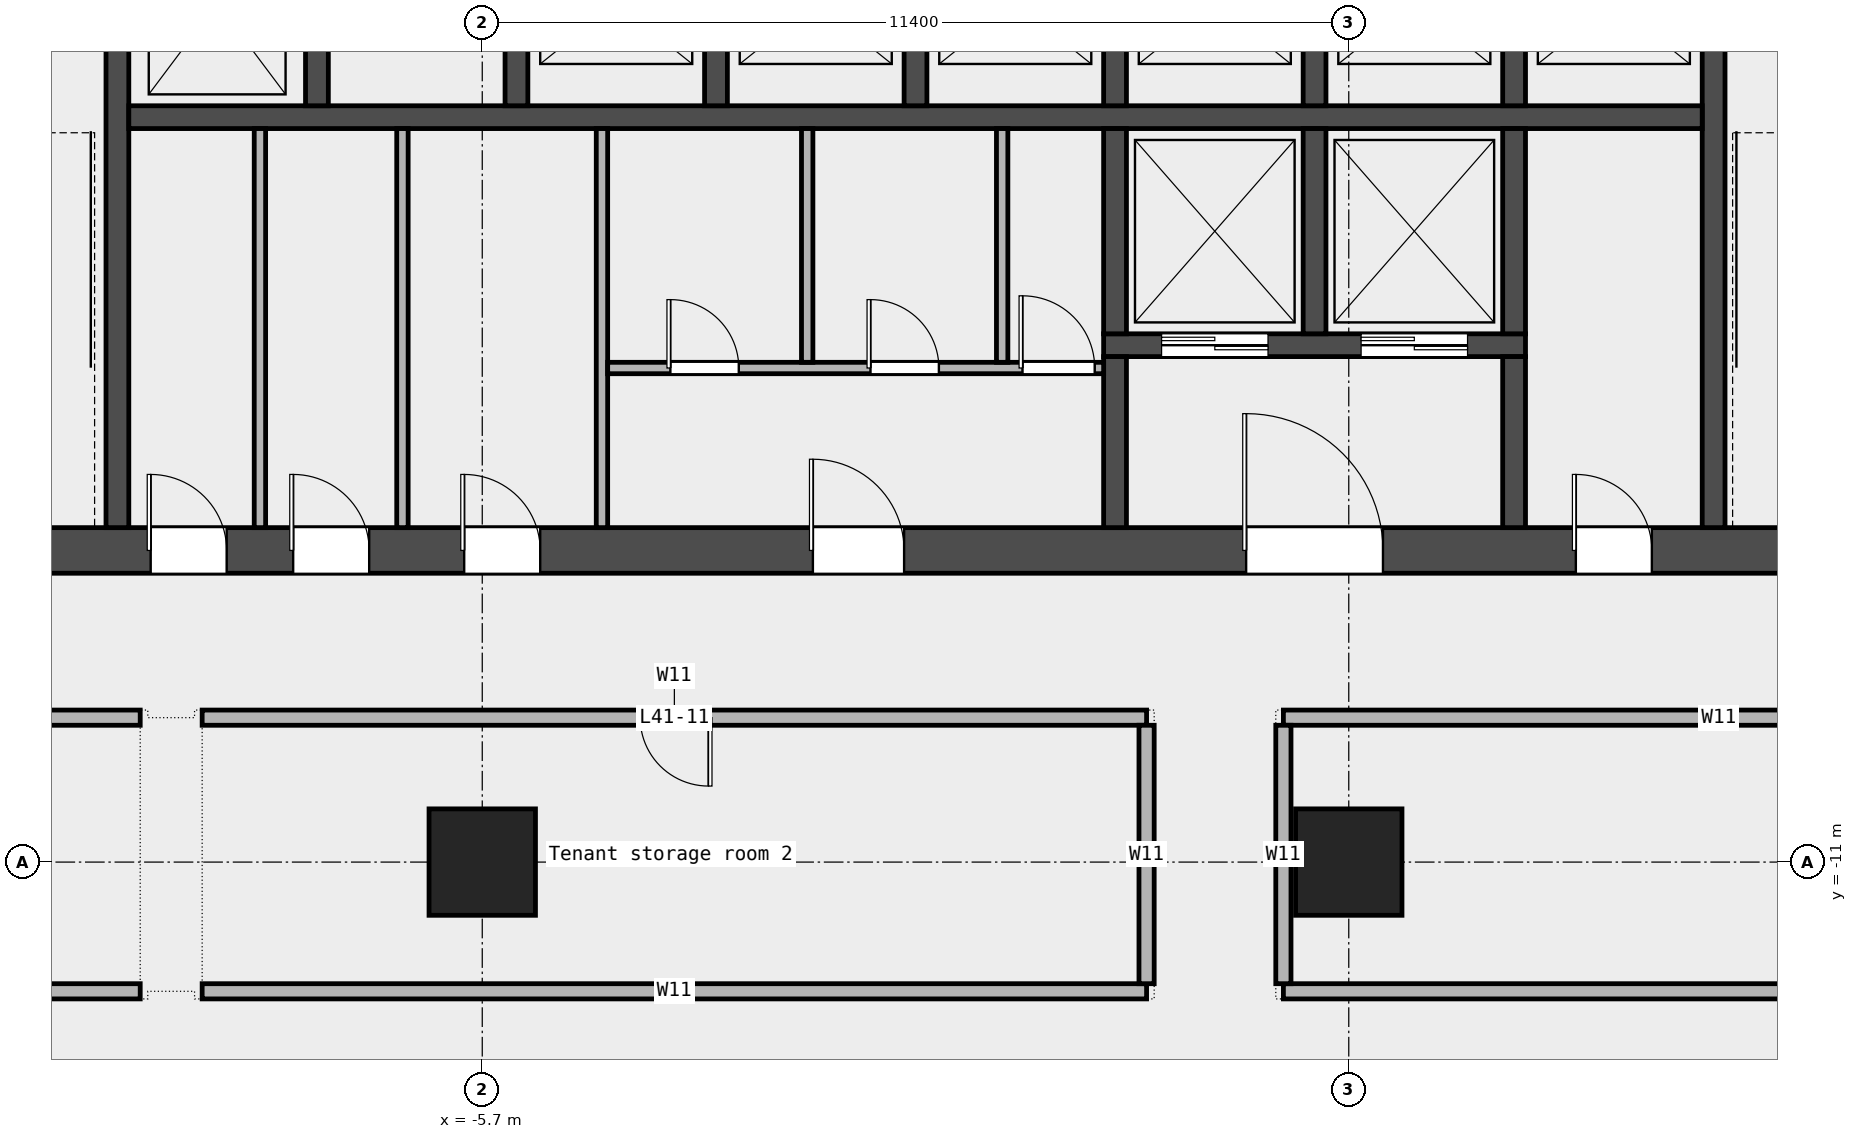
"""IFC4 building model, lengths in metres.
Left out: names, types, materials, properties, quantities, classifications, styles, units other than length and angle.
Written with IfcOpenShell. Run it as: python <this file> out.ifc"""

import sys

from ifc_helpers import new_model, si_unit, direction, frame, frame_2d, origin, origin_2d, place, context, subcontext, project, spatial, rectangle, extrude, element, fill, save


model = new_model("IFC4")
c1 = context("Model", 3, precision=1e-05, world=origin(), true_north=direction((0.0, 1.0)))
c2 = subcontext(c1, "Body", "Model", "MODEL_VIEW")
j1 = project(units=[si_unit("LENGTHUNIT", "METRE"), si_unit("PLANEANGLEUNIT", "RADIAN")], contexts=[c1])
p1 = place(None, origin())
s1 = spatial("IfcSite", under=j1, at=p1, CompositionType="ELEMENT")
p2 = place(p1, origin())
s2 = spatial("IfcBuilding", under=s1, at=p2, CompositionType="ELEMENT")
p3 = place(p2, frame((0.0, 0.0, 197.0)))
s3 = spatial("IfcBuildingStorey", under=s2, at=p3, CompositionType="ELEMENT", Elevation=197.0)
for number, where, z_axis, x_axis in (
    (1, (-5.7, -11.0, 0.0), (0.0, 0.0, 1.0), (1.0, 0.0, 0.0)),
    (2, (5.7, -11.0, 0.0), (0.0, 0.0, 1.0), (1.0, 0.0, 0.0)),
):
    element("IfcColumn", number, at=place(p3, frame(where, z_axis=z_axis, x_axis=x_axis)), inside=s3, PredefinedType="COLUMN", context=c2, shape_type="SweptSolid", body=[
        extrude(rectangle(XDim=1.4, YDim=1.4, at=origin_2d()), origin(), (0.0, 0.0, 1.0), 3.6),
    ])
p4 = place(p3, frame((-24.15, -12.7, 0.0), z_axis=(0.0, 0.0, 1.0), x_axis=(1.0, 0.0, 0.0)))
e3 = element("IfcWall", 3, at=p4, inside=s3, PredefinedType="PARTITIONING", context=c2, shape_type="SweptSolid", body=[
    extrude(rectangle(XDim=13.95, YDim=0.2, at=frame_2d((6.975, 0.0))), origin(), (0.0, 0.0, 1.0), 3.6),
])
p5 = place(p4, frame((7.825, 0.0, 0.0)))
e4 = element("IfcOpeningElement", 4, at=p5, cuts=e3, PredefinedType="OPENING", context=c2, shape_type="SweptSolid", body=[
    extrude(rectangle(XDim=1.5, YDim=2.1, at=frame_2d((0.75, 1.05))), frame((0.0, 0.112, 0.0), z_axis=(0.0, -1.0, 0.0), x_axis=(1.0, 0.0, 0.0)), (0.0, 0.0, 1.0), 0.224),
])
p6 = place(p3, frame((-9.385, -12.7, 0.0), z_axis=(0.0, 0.0, 1.0), x_axis=(1.0, 0.0, 0.0)))
e5 = element("IfcWall", 5, at=p6, inside=s3, PredefinedType="PARTITIONING", context=c2, shape_type="SweptSolid", body=[
    extrude(rectangle(XDim=12.425, YDim=0.2, at=frame_2d((6.212, 0.0))), origin(), (0.0, 0.0, 1.0), 3.6),
])
p7 = place(p3, frame((4.84, -12.7, 0.0), z_axis=(0.0, 0.0, 1.0), x_axis=(1.0, 0.0, 0.0)))
e6 = element("IfcWall", 6, at=p7, inside=s3, PredefinedType="PARTITIONING", context=c2, shape_type="SweptSolid", body=[
    extrude(rectangle(XDim=21.31, YDim=0.2, at=frame_2d((10.655, 0.0))), origin(), (0.0, 0.0, 1.0), 3.6),
])
p8 = place(p7, frame((9.955, 0.0, 0.0)))
e7 = element("IfcOpeningElement", 7, at=p8, cuts=e6, PredefinedType="OPENING", context=c2, shape_type="SweptSolid", body=[
    extrude(rectangle(XDim=1.2, YDim=2.1, at=frame_2d((0.6, 1.05))), frame((0.0, 0.112, 0.0), z_axis=(0.0, -1.0, 0.0), x_axis=(1.0, 0.0, 0.0)), (0.0, 0.0, 1.0), 0.224),
])
p9 = place(p3, frame((-16.3, -9.1, 0.0), z_axis=(0.0, 0.0, 1.0), x_axis=(1.0, 0.0, 0.0)))
e8 = element("IfcWall", 8, at=p9, inside=s3, PredefinedType="PARTITIONING", context=c2, shape_type="SweptSolid", body=[
    extrude(rectangle(XDim=6.1, YDim=0.2, at=frame_2d((3.05, 0.0))), origin(), (0.0, 0.0, 1.0), 3.6),
])
p10 = place(p3, frame((-9.385, -9.1, 0.0), z_axis=(0.0, 0.0, 1.0), x_axis=(1.0, 0.0, 0.0)))
e9 = element("IfcWall", 9, at=p10, inside=s3, PredefinedType="PARTITIONING", context=c2, shape_type="SweptSolid", body=[
    extrude(rectangle(XDim=12.425, YDim=0.2, at=frame_2d((6.212, 0.0))), origin(), (0.0, 0.0, 1.0), 3.6),
])
p11 = place(p10, frame((5.762, 0.0, 0.0)))
e10 = element("IfcOpeningElement", 10, at=p11, cuts=e9, PredefinedType="OPENING", context=c2, shape_type="SweptSolid", body=[
    extrude(rectangle(XDim=0.9, YDim=2.1, at=frame_2d((0.45, 1.05))), frame((0.0, 0.112, 0.0), z_axis=(0.0, -1.0, 0.0), x_axis=(1.0, 0.0, 0.0)), (0.0, 0.0, 1.0), 0.224),
])
p12 = place(p3, frame((4.84, -9.1, 0.0), z_axis=(0.0, 0.0, 1.0), x_axis=(1.0, 0.0, 0.0)))
e11 = element("IfcWall", 11, at=p12, inside=s3, PredefinedType="PARTITIONING", context=c2, shape_type="SweptSolid", body=[
    extrude(rectangle(XDim=11.46, YDim=0.2, at=frame_2d((5.73, 0.0))), origin(), (0.0, 0.0, 1.0), 3.6),
])
for number, where, z_axis, x_axis in (
    (12, (3.04, -12.6, 0.0), (0.0, 0.0, 1.0), (0.0, 1.0, 0.0)),
    (13, (4.84, -12.6, 0.0), (0.0, 0.0, 1.0), (0.0, 1.0, 0.0)),
):
    element("IfcWall", number, at=place(p3, frame(where, z_axis=z_axis, x_axis=x_axis)), inside=s3, PredefinedType="PARTITIONING", context=c2, shape_type="SweptSolid", body=[
        extrude(rectangle(XDim=3.4, YDim=0.2, at=frame_2d((1.7, 0.0))), origin(), (0.0, 0.0, 1.0), 3.6),
    ])
p13 = place(p3, frame((-14.4, -6.9, 0.0), z_axis=(0.0, 0.0, 1.0), x_axis=(1.0, 0.0, 0.0)))
e14 = element("IfcWall", 14, at=p13, inside=s3, PredefinedType="SHEAR", context=c2, shape_type="SweptSolid", body=[
    extrude(rectangle(XDim=28.8, YDim=0.6, at=frame_2d((14.4, 0.0))), origin(), (0.0, 0.0, 1.0), 3.7),
])
p14 = place(p13, frame((4.337, 0.0, 0.0)))
e15 = element("IfcOpeningElement", 15, at=p14, cuts=e14, PredefinedType="OPENING", context=c2, shape_type="SweptSolid", body=[
    extrude(rectangle(XDim=1.0, YDim=2.1, at=frame_2d((0.5, 1.05))), frame((0.0, 0.312, 0.0), z_axis=(0.0, -1.0, 0.0), x_axis=(1.0, 0.0, 0.0)), (0.0, 0.0, 1.0), 0.624),
])
p15 = place(p13, frame((6.212, 0.0, 0.0)))
e16 = element("IfcOpeningElement", 16, at=p15, cuts=e14, PredefinedType="OPENING", context=c2, shape_type="SweptSolid", body=[
    extrude(rectangle(XDim=1.0, YDim=2.1, at=frame_2d((0.5, 1.05))), frame((0.0, 0.312, 0.0), z_axis=(0.0, -1.0, 0.0), x_axis=(1.0, 0.0, 0.0)), (0.0, 0.0, 1.0), 0.624),
])
p16 = place(p13, frame((8.462, 0.0, 0.0)))
e17 = element("IfcOpeningElement", 17, at=p16, cuts=e14, PredefinedType="OPENING", context=c2, shape_type="SweptSolid", body=[
    extrude(rectangle(XDim=1.0, YDim=2.1, at=frame_2d((0.5, 1.05))), frame((0.0, 0.312, 0.0), z_axis=(0.0, -1.0, 0.0), x_axis=(1.0, 0.0, 0.0)), (0.0, 0.0, 1.0), 0.624),
])
p17 = place(p13, frame((13.05, 0.0, 0.0)))
e18 = element("IfcOpeningElement", 18, at=p17, cuts=e14, PredefinedType="OPENING", context=c2, shape_type="SweptSolid", body=[
    extrude(rectangle(XDim=1.2, YDim=2.1, at=frame_2d((0.6, 1.05))), frame((0.0, 0.312, 0.0), z_axis=(0.0, -1.0, 0.0), x_axis=(1.0, 0.0, 0.0)), (0.0, 0.0, 1.0), 0.624),
])
p18 = place(p13, frame((18.75, 0.0, 0.0)))
e19 = element("IfcOpeningElement", 19, at=p18, cuts=e14, PredefinedType="OPENING", context=c2, shape_type="SweptSolid", body=[
    extrude(rectangle(XDim=1.8, YDim=2.1, at=frame_2d((0.9, 1.05))), frame((0.0, 0.312, 0.0), z_axis=(0.0, -1.0, 0.0), x_axis=(1.0, 0.0, 0.0)), (0.0, 0.0, 1.0), 0.624),
])
p19 = place(p13, frame((23.087, 0.0, 0.0)))
e20 = element("IfcOpeningElement", 20, at=p19, cuts=e14, PredefinedType="OPENING", context=c2, shape_type="SweptSolid", body=[
    extrude(rectangle(XDim=1.0, YDim=2.1, at=frame_2d((0.5, 1.05))), frame((0.0, 0.312, 0.0), z_axis=(0.0, -1.0, 0.0), x_axis=(1.0, 0.0, 0.0)), (0.0, 0.0, 1.0), 0.624),
])
for number, where, z_axis, x_axis in (
    (21, (-10.5, -6.6, 0.0), (0.0, 0.0, 1.0), (0.0, 1.0, 0.0)),
    (22, (10.5, -6.6, 0.0), (0.0, 0.0, 1.0), (0.0, 1.0, 0.0)),
):
    element("IfcWall", number, at=place(p3, frame(where, z_axis=z_axis, x_axis=x_axis)), inside=s3, PredefinedType="SHEAR", context=c2, shape_type="SweptSolid", body=[
        extrude(rectangle(XDim=8.55, YDim=0.3, at=frame_2d((4.275, 0.0))), origin(), (0.0, 0.0, 1.0), 3.7),
    ])
p20 = place(p3, frame((-10.35, -1.2, 0.0), z_axis=(0.0, 0.0, 1.0), x_axis=(1.0, 0.0, 0.0)))
e23 = element("IfcWall", 23, at=p20, inside=s3, PredefinedType="SOLIDWALL", context=c2, shape_type="SweptSolid", body=[
    extrude(rectangle(XDim=20.7, YDim=0.3, at=frame_2d((10.35, 0.0))), origin(), (0.0, 0.0, 1.0), 3.7),
])
for number, where, z_axis, x_axis in (
    (24, (-7.875, -1.05, 0.0), (0.0, 0.0, 1.0), (0.0, 1.0, 0.0)),
    (25, (-5.25, -1.05, 0.0), (0.0, 0.0, 1.0), (0.0, 1.0, 0.0)),
    (26, (-2.625, -1.05, 0.0), (0.0, 0.0, 1.0), (0.0, 1.0, 0.0)),
    (27, (0.0, -1.05, 0.0), (0.0, 0.0, 1.0), (0.0, 1.0, 0.0)),
    (28, (2.625, -1.05, 0.0), (0.0, 0.0, 1.0), (0.0, 1.0, 0.0)),
    (29, (5.25, -1.05, 0.0), (0.0, 0.0, 1.0), (0.0, 1.0, 0.0)),
    (30, (7.875, -1.05, 0.0), (0.0, 0.0, 1.0), (0.0, 1.0, 0.0)),
):
    element("IfcWall", number, at=place(p3, frame(where, z_axis=z_axis, x_axis=x_axis)), inside=s3, PredefinedType="SOLIDWALL", context=c2, shape_type="SweptSolid", body=[
        extrude(rectangle(XDim=2.7, YDim=0.3, at=frame_2d((1.35, 0.0))), origin(), (0.0, 0.0, 1.0), 3.7),
    ])
p21 = place(p3, frame((2.475, -4.2, 0.0), z_axis=(0.0, 0.0, 1.0), x_axis=(1.0, 0.0, 0.0)))
e31 = element("IfcWall", 31, at=p21, inside=s3, PredefinedType="SOLIDWALL", context=c2, shape_type="SweptSolid", body=[
    extrude(rectangle(XDim=5.55, YDim=0.3, at=frame_2d((2.775, 0.0))), origin(), (0.0, 0.0, 1.0), 3.7),
])
p22 = place(p21, frame((0.762, 0.0, 0.0)))
e32 = element("IfcOpeningElement", 32, at=p22, cuts=e31, PredefinedType="OPENING", context=c2, shape_type="SweptSolid", body=[
    extrude(rectangle(XDim=1.4, YDim=2.1, at=frame_2d((0.7, 1.05))), frame((0.0, 0.162, 0.0), z_axis=(0.0, -1.0, 0.0), x_axis=(1.0, 0.0, 0.0)), (0.0, 0.0, 1.0), 0.324),
])
p23 = place(p21, frame((3.387, 0.0, 0.0)))
e33 = element("IfcOpeningElement", 33, at=p23, cuts=e31, PredefinedType="OPENING", context=c2, shape_type="SweptSolid", body=[
    extrude(rectangle(XDim=1.4, YDim=2.1, at=frame_2d((0.7, 1.05))), frame((0.0, 0.162, 0.0), z_axis=(0.0, -1.0, 0.0), x_axis=(1.0, 0.0, 0.0)), (0.0, 0.0, 1.0), 0.324),
])
p24 = place(p3, frame((2.625, -4.05, 0.0), z_axis=(0.0, 0.0, 1.0), x_axis=(0.0, 1.0, 0.0)))
e34 = element("IfcWall", 34, at=p24, inside=s3, PredefinedType="SOLIDWALL", context=c2, shape_type="SweptSolid", body=[
    extrude(rectangle(XDim=2.7, YDim=0.3, at=frame_2d((1.35, 0.0))), origin(), (0.0, 0.0, 1.0), 3.7),
])
p25 = place(p3, frame((2.625, -6.6, 0.0), z_axis=(0.0, 0.0, 1.0), x_axis=(0.0, 1.0, 0.0)))
e35 = element("IfcWall", 35, at=p25, inside=s3, PredefinedType="SOLIDWALL", context=c2, shape_type="SweptSolid", body=[
    extrude(rectangle(XDim=2.25, YDim=0.3, at=frame_2d((1.125, 0.0))), origin(), (0.0, 0.0, 1.0), 3.7),
])
for number, where, z_axis, x_axis in (
    (36, (5.25, -4.05, 0.0), (0.0, 0.0, 1.0), (0.0, 1.0, 0.0)),
    (37, (7.875, -4.05, 0.0), (0.0, 0.0, 1.0), (0.0, 1.0, 0.0)),
):
    element("IfcWall", number, at=place(p3, frame(where, z_axis=z_axis, x_axis=x_axis)), inside=s3, PredefinedType="SOLIDWALL", context=c2, shape_type="SweptSolid", body=[
        extrude(rectangle(XDim=2.7, YDim=0.3, at=frame_2d((1.35, 0.0))), origin(), (0.0, 0.0, 1.0), 3.7),
    ])
p26 = place(p3, frame((7.875, -6.6, 0.0), z_axis=(0.0, 0.0, 1.0), x_axis=(0.0, 1.0, 0.0)))
e38 = element("IfcWall", 38, at=p26, inside=s3, PredefinedType="SOLIDWALL", context=c2, shape_type="SweptSolid", body=[
    extrude(rectangle(XDim=2.25, YDim=0.3, at=frame_2d((1.125, 0.0))), origin(), (0.0, 0.0, 1.0), 3.7),
])
for number, where, z_axis, x_axis in (
    (39, (-8.625, -6.6, 0.0), (0.0, 0.0, 1.0), (0.0, 1.0, 0.0)),
    (40, (-6.75, -6.6, 0.0), (0.0, 0.0, 1.0), (0.0, 1.0, 0.0)),
    (41, (-4.125, -6.6, 0.0), (0.0, 0.0, 1.0), (0.0, 1.0, 0.0)),
):
    element("IfcWall", number, at=place(p3, frame(where, z_axis=z_axis, x_axis=x_axis)), inside=s3, PredefinedType="PARTITIONING", context=c2, shape_type="SweptSolid", body=[
        extrude(rectangle(XDim=5.25, YDim=0.15, at=frame_2d((2.625, 0.0))), origin(), (0.0, 0.0, 1.0), 3.7),
    ])
p27 = place(p3, frame((-4.05, -4.5, 0.0), z_axis=(0.0, 0.0, 1.0), x_axis=(1.0, 0.0, 0.0)))
e42 = element("IfcWall", 42, at=p27, inside=s3, PredefinedType="PARTITIONING", context=c2, shape_type="SweptSolid", body=[
    extrude(rectangle(XDim=6.525, YDim=0.15, at=frame_2d((3.263, 0.0))), origin(), (0.0, 0.0, 1.0), 3.7),
])
p28 = place(p27, frame((0.825, 0.0, 0.0)))
e43 = element("IfcOpeningElement", 43, at=p28, cuts=e42, PredefinedType="OPENING", context=c2, shape_type="SweptSolid", body=[
    extrude(rectangle(XDim=0.9, YDim=2.1, at=frame_2d((0.45, 1.05))), frame((0.0, 0.087, 0.0), z_axis=(0.0, -1.0, 0.0), x_axis=(1.0, 0.0, 0.0)), (0.0, 0.0, 1.0), 0.174),
])
p29 = place(p27, frame((3.458, 0.0, 0.0)))
e44 = element("IfcOpeningElement", 44, at=p29, cuts=e42, PredefinedType="OPENING", context=c2, shape_type="SweptSolid", body=[
    extrude(rectangle(XDim=0.9, YDim=2.1, at=frame_2d((0.45, 1.05))), frame((0.0, 0.087, 0.0), z_axis=(0.0, -1.0, 0.0), x_axis=(1.0, 0.0, 0.0)), (0.0, 0.0, 1.0), 0.174),
])
p30 = place(p27, frame((5.458, 0.0, 0.0)))
e45 = element("IfcOpeningElement", 45, at=p30, cuts=e42, PredefinedType="OPENING", context=c2, shape_type="SweptSolid", body=[
    extrude(rectangle(XDim=0.95, YDim=2.1, at=frame_2d((0.475, 1.05))), frame((0.0, 0.087, 0.0), z_axis=(0.0, -1.0, 0.0), x_axis=(1.0, 0.0, 0.0)), (0.0, 0.0, 1.0), 0.174),
])
for number, where, z_axis, x_axis in (
    (46, (-1.425, -4.425, 0.0), (0.0, 0.0, 1.0), (0.0, 1.0, 0.0)),
    (47, (1.14, -4.425, 0.0), (0.0, 0.0, 1.0), (0.0, 1.0, 0.0)),
):
    element("IfcWall", number, at=place(p3, frame(where, z_axis=z_axis, x_axis=x_axis)), inside=s3, PredefinedType="PARTITIONING", context=c2, shape_type="SweptSolid", body=[
        extrude(rectangle(XDim=3.075, YDim=0.15, at=frame_2d((1.538, 0.0))), origin(), (0.0, 0.0, 1.0), 3.7),
    ])
p31 = place(p11, origin())
e48 = element("IfcDoor", 48, at=p31, inside=s3, OperationType="SINGLE_SWING_LEFT", PredefinedType="DOOR", context=c2, shape_type="SweptSolid", body=[
    extrude(rectangle(XDim=0.9, YDim=2.1, at=frame_2d((0.45, 1.05))), frame((0.0, 0.025, 0.0), z_axis=(0.0, -1.0, 0.0), x_axis=(1.0, 0.0, 0.0)), (0.0, 0.0, 1.0), 0.05),
])
fill(e10, e48)
p32 = place(p22, origin())
e49 = element("IfcDoor", 49, at=p32, inside=s3, OperationType="DOUBLE_DOOR_SLIDING", PredefinedType="DOOR", context=c2, shape_type="SweptSolid", body=[
    extrude(rectangle(XDim=1.4, YDim=2.1, at=frame_2d((0.7, 1.05))), frame((0.0, 0.025, 0.0), z_axis=(0.0, -1.0, 0.0), x_axis=(1.0, 0.0, 0.0)), (0.0, 0.0, 1.0), 0.05),
])
fill(e32, e49)
p33 = place(p23, origin())
e50 = element("IfcDoor", 50, at=p33, inside=s3, OperationType="DOUBLE_DOOR_SLIDING", PredefinedType="DOOR", context=c2, shape_type="SweptSolid", body=[
    extrude(rectangle(XDim=1.4, YDim=2.1, at=frame_2d((0.7, 1.05))), frame((0.0, 0.025, 0.0), z_axis=(0.0, -1.0, 0.0), x_axis=(1.0, 0.0, 0.0)), (0.0, 0.0, 1.0), 0.05),
])
fill(e33, e50)
p34 = place(p14, origin())
e51 = element("IfcDoor", 51, at=p34, inside=s3, OperationType="SINGLE_SWING_LEFT", PredefinedType="DOOR", context=c2, shape_type="SweptSolid", body=[
    extrude(rectangle(XDim=1.0, YDim=2.1, at=frame_2d((0.5, 1.05))), frame((0.0, 0.025, 0.0), z_axis=(0.0, -1.0, 0.0), x_axis=(1.0, 0.0, 0.0)), (0.0, 0.0, 1.0), 0.05),
])
fill(e15, e51)
p35 = place(p15, origin())
e52 = element("IfcDoor", 52, at=p35, inside=s3, OperationType="SINGLE_SWING_LEFT", PredefinedType="DOOR", context=c2, shape_type="SweptSolid", body=[
    extrude(rectangle(XDim=1.0, YDim=2.1, at=frame_2d((0.5, 1.05))), frame((0.0, 0.025, 0.0), z_axis=(0.0, -1.0, 0.0), x_axis=(1.0, 0.0, 0.0)), (0.0, 0.0, 1.0), 0.05),
])
fill(e16, e52)
p36 = place(p16, origin())
e53 = element("IfcDoor", 53, at=p36, inside=s3, OperationType="SINGLE_SWING_LEFT", PredefinedType="DOOR", context=c2, shape_type="SweptSolid", body=[
    extrude(rectangle(XDim=1.0, YDim=2.1, at=frame_2d((0.5, 1.05))), frame((0.0, 0.025, 0.0), z_axis=(0.0, -1.0, 0.0), x_axis=(1.0, 0.0, 0.0)), (0.0, 0.0, 1.0), 0.05),
])
fill(e17, e53)
p37 = place(p17, origin())
e54 = element("IfcDoor", 54, at=p37, inside=s3, OperationType="SINGLE_SWING_LEFT", PredefinedType="DOOR", context=c2, shape_type="SweptSolid", body=[
    extrude(rectangle(XDim=1.2, YDim=2.1, at=frame_2d((0.6, 1.05))), frame((0.0, 0.025, 0.0), z_axis=(0.0, -1.0, 0.0), x_axis=(1.0, 0.0, 0.0)), (0.0, 0.0, 1.0), 0.05),
])
fill(e18, e54)
p38 = place(p28, origin())
e55 = element("IfcDoor", 55, at=p38, inside=s3, OperationType="SINGLE_SWING_LEFT", PredefinedType="DOOR", context=c2, shape_type="SweptSolid", body=[
    extrude(rectangle(XDim=0.9, YDim=2.1, at=frame_2d((0.45, 1.05))), frame((0.0, 0.025, 0.0), z_axis=(0.0, -1.0, 0.0), x_axis=(1.0, 0.0, 0.0)), (0.0, 0.0, 1.0), 0.05),
])
fill(e43, e55)
p39 = place(p29, origin())
e56 = element("IfcDoor", 56, at=p39, inside=s3, OperationType="SINGLE_SWING_LEFT", PredefinedType="DOOR", context=c2, shape_type="SweptSolid", body=[
    extrude(rectangle(XDim=0.9, YDim=2.1, at=frame_2d((0.45, 1.05))), frame((0.0, 0.025, 0.0), z_axis=(0.0, -1.0, 0.0), x_axis=(1.0, 0.0, 0.0)), (0.0, 0.0, 1.0), 0.05),
])
fill(e44, e56)
p40 = place(p30, origin())
e57 = element("IfcDoor", 57, at=p40, inside=s3, OperationType="SINGLE_SWING_LEFT", PredefinedType="DOOR", context=c2, shape_type="SweptSolid", body=[
    extrude(rectangle(XDim=0.95, YDim=2.1, at=frame_2d((0.475, 1.05))), frame((0.0, 0.025, 0.0), z_axis=(0.0, -1.0, 0.0), x_axis=(1.0, 0.0, 0.0)), (0.0, 0.0, 1.0), 0.05),
])
fill(e45, e57)
p41 = place(p18, origin())
e58 = element("IfcDoor", 58, at=p41, inside=s3, OperationType="DOUBLE_DOOR_SINGLE_SWING", PredefinedType="DOOR", context=c2, shape_type="SweptSolid", body=[
    extrude(rectangle(XDim=1.8, YDim=2.1, at=frame_2d((0.9, 1.05))), frame((0.0, 0.025, 0.0), z_axis=(0.0, -1.0, 0.0), x_axis=(1.0, 0.0, 0.0)), (0.0, 0.0, 1.0), 0.05),
])
fill(e19, e58)
p42 = place(p19, origin())
e59 = element("IfcDoor", 59, at=p42, inside=s3, OperationType="SINGLE_SWING_LEFT", PredefinedType="DOOR", context=c2, shape_type="SweptSolid", body=[
    extrude(rectangle(XDim=1.0, YDim=2.1, at=frame_2d((0.5, 1.05))), frame((0.0, 0.025, 0.0), z_axis=(0.0, -1.0, 0.0), x_axis=(1.0, 0.0, 0.0)), (0.0, 0.0, 1.0), 0.05),
])
fill(e20, e59)
save(model, sys.argv[1])
